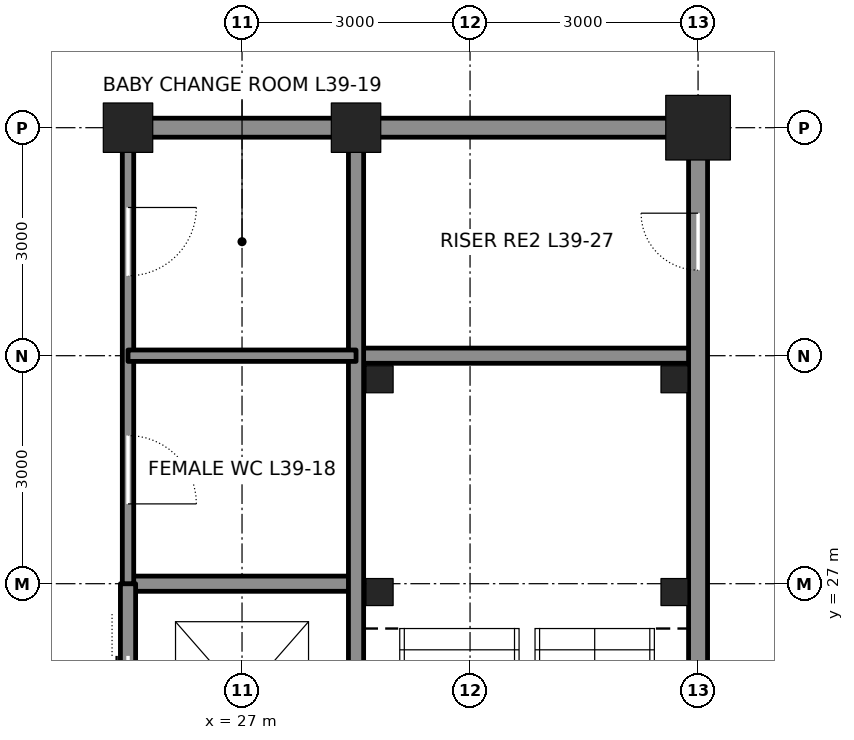
"""IFC4 building model, lengths in metres.
Left out: names, types, materials, properties, quantities, classifications, styles, units other than length and angle.
Written with IfcOpenShell. Run it as: python <this file> out.ifc"""

import sys

from ifc_helpers import new_model, si_unit, direction, frame, frame_2d, origin, origin_2d, place, context, subcontext, project, spatial, rectangle, hollow_rectangle, extrude, element, fill, save


model = new_model("IFC4")
c1 = context("Model", 3, precision=1e-05, world=origin(), true_north=direction((0.0, 1.0)))
c2 = subcontext(c1, "Body", "Model", "MODEL_VIEW")
j1 = project(units=[si_unit("LENGTHUNIT", "METRE"), si_unit("PLANEANGLEUNIT", "RADIAN")], contexts=[c1])
p1 = place(None, origin())
s1 = spatial("IfcSite", under=j1, at=p1, CompositionType="ELEMENT")
p2 = place(p1, origin())
s2 = spatial("IfcBuilding", under=s1, at=p2, CompositionType="ELEMENT")
p3 = place(p2, frame((0.0, 0.0, 180.0)))
s3 = spatial("IfcBuildingStorey", under=s2, at=p3, CompositionType="ELEMENT", Elevation=180.0)
for number, where, z_axis, x_axis in (
    (1, (25.5, 33.0, 0.0), (0.0, 0.0, 1.0), (1.0, 0.0, 0.0)),
    (2, (28.5, 33.0, 0.0), (0.0, 0.0, 1.0), (1.0, 0.0, 0.0)),
):
    element("IfcColumn", number, at=place(p3, frame(where, z_axis=z_axis, x_axis=x_axis)), inside=s3, PredefinedType="COLUMN", context=c2, shape_type="SweptSolid", body=[
        extrude(hollow_rectangle(XDim=0.65, YDim=0.65, WallThickness=0.065, at=origin_2d()), origin(), (0.0, 0.0, 1.0), 4.5),
    ])
p4 = place(p3, frame((33.0, 33.0, 0.0), z_axis=(0.0, 0.0, 1.0), x_axis=(1.0, 0.0, 0.0)))
e3 = element("IfcColumn", 3, at=p4, inside=s3, PredefinedType="COLUMN", context=c2, shape_type="SweptSolid", body=[
    extrude(hollow_rectangle(XDim=0.85, YDim=0.85, WallThickness=0.085, at=origin_2d()), origin(), (0.0, 0.0, 1.0), 4.5),
])
p5 = place(p3, frame((25.5, 27.0, 0.0), z_axis=(0.0, 0.0, 1.0), x_axis=(1.0, 0.0, 0.0)))
e4 = element("IfcWall", 4, at=p5, inside=s3, PredefinedType="SOLIDWALL", context=c2, shape_type="SweptSolid", body=[
    extrude(rectangle(XDim=3.0, YDim=0.2, at=frame_2d((1.5, 0.0))), origin(), (0.0, 0.0, 1.0), 4.34),
])
p6 = place(p3, frame((28.5, 30.0, 0.0), z_axis=(0.0, 0.0, 1.0), x_axis=(1.0, 0.0, 0.0)))
e5 = element("IfcWall", 5, at=p6, inside=s3, PredefinedType="SOLIDWALL", context=c2, shape_type="SweptSolid", body=[
    extrude(rectangle(XDim=4.5, YDim=0.2, at=frame_2d((2.25, 0.0))), origin(), (0.0, 0.0, 1.0), 4.34),
])
p7 = place(p3, frame((25.75, 33.0, 0.0), z_axis=(0.0, 0.0, 1.0), x_axis=(1.0, 0.0, 0.0)))
e6 = element("IfcWall", 6, at=p7, inside=s3, PredefinedType="SOLIDWALL", context=c2, shape_type="SweptSolid", body=[
    extrude(rectangle(XDim=2.5, YDim=0.25, at=frame_2d((1.25, 0.0))), origin(), (0.0, 0.0, 1.0), 3.481),
])
p8 = place(p3, frame((28.75, 33.0, 0.0), z_axis=(0.0, 0.0, 1.0), x_axis=(1.0, 0.0, 0.0)))
e7 = element("IfcWall", 7, at=p8, inside=s3, PredefinedType="SOLIDWALL", context=c2, shape_type="SweptSolid", body=[
    extrude(rectangle(XDim=4.0, YDim=0.25, at=frame_2d((2.0, 0.0))), origin(), (0.0, 0.0, 1.0), 3.481),
])
p9 = place(p3, frame((25.5, 15.0, 0.0), z_axis=(0.0, 0.0, 1.0), x_axis=(0.0, 1.0, 0.0)))
e8 = element("IfcWall", 8, at=p9, inside=s3, PredefinedType="SOLIDWALL", context=c2, shape_type="SweptSolid", body=[
    extrude(rectangle(XDim=12.0, YDim=0.2, at=frame_2d((6.0, 0.0))), origin(), (0.0, 0.0, 1.0), 3.365),
])
p10 = place(p9, frame((0.95, 0.0, 0.0)))
e9 = element("IfcOpeningElement", 9, at=p10, cuts=e8, PredefinedType="OPENING", context=c2, shape_type="SweptSolid", body=[
    extrude(rectangle(XDim=1.1, YDim=2.1, at=frame_2d((0.55, 1.05))), frame((0.0, 0.11, 0.0), z_axis=(0.0, -1.0, 0.0), x_axis=(1.0, 0.0, 0.0)), (0.0, 0.0, 1.0), 0.22),
])
p11 = place(p9, frame((3.95, 0.0, 0.0)))
e10 = element("IfcOpeningElement", 10, at=p11, cuts=e8, PredefinedType="OPENING", context=c2, shape_type="SweptSolid", body=[
    extrude(rectangle(XDim=1.1, YDim=2.1, at=frame_2d((0.55, 1.05))), frame((0.0, 0.11, 0.0), z_axis=(0.0, -1.0, 0.0), x_axis=(1.0, 0.0, 0.0)), (0.0, 0.0, 1.0), 0.22),
])
p12 = place(p9, frame((6.95, 0.0, 0.0)))
e11 = element("IfcOpeningElement", 11, at=p12, cuts=e8, PredefinedType="OPENING", context=c2, shape_type="SweptSolid", body=[
    extrude(rectangle(XDim=1.1, YDim=2.1, at=frame_2d((0.55, 1.05))), frame((0.0, 0.11, 0.0), z_axis=(0.0, -1.0, 0.0), x_axis=(1.0, 0.0, 0.0)), (0.0, 0.0, 1.0), 0.22),
])
p13 = place(p9, frame((9.95, 0.0, 0.0)))
e12 = element("IfcOpeningElement", 12, at=p13, cuts=e8, PredefinedType="OPENING", context=c2, shape_type="SweptSolid", body=[
    extrude(rectangle(XDim=1.1, YDim=2.1, at=frame_2d((0.55, 1.05))), frame((0.0, 0.11, 0.0), z_axis=(0.0, -1.0, 0.0), x_axis=(1.0, 0.0, 0.0)), (0.0, 0.0, 1.0), 0.22),
])
p14 = place(p3, frame((25.5, 27.0, 0.0), z_axis=(0.0, 0.0, 1.0), x_axis=(0.0, 1.0, 0.0)))
e13 = element("IfcWall", 13, at=p14, inside=s3, PredefinedType="PARTITIONING", context=c2, shape_type="SweptSolid", body=[
    extrude(rectangle(XDim=5.75, YDim=0.15, at=frame_2d((2.875, 0.0))), origin(), (0.0, 0.0, 1.0), 3.365),
])
p15 = place(p14, frame((1.05, 0.0, 0.0)))
e14 = element("IfcOpeningElement", 14, at=p15, cuts=e13, PredefinedType="OPENING", context=c2, shape_type="SweptSolid", body=[
    extrude(rectangle(XDim=0.9, YDim=2.1, at=frame_2d((0.45, 1.05))), frame((0.0, 0.085, 0.0), z_axis=(0.0, -1.0, 0.0), x_axis=(1.0, 0.0, 0.0)), (0.0, 0.0, 1.0), 0.17),
])
p16 = place(p14, frame((4.05, 0.0, 0.0)))
e15 = element("IfcOpeningElement", 15, at=p16, cuts=e13, PredefinedType="OPENING", context=c2, shape_type="SweptSolid", body=[
    extrude(rectangle(XDim=0.9, YDim=2.1, at=frame_2d((0.45, 1.05))), frame((0.0, 0.085, 0.0), z_axis=(0.0, -1.0, 0.0), x_axis=(1.0, 0.0, 0.0)), (0.0, 0.0, 1.0), 0.17),
])
p17 = place(p3, frame((28.5, 24.25, 0.0), z_axis=(0.0, 0.0, 1.0), x_axis=(0.0, 1.0, 0.0)))
e16 = element("IfcWall", 16, at=p17, inside=s3, PredefinedType="SOLIDWALL", context=c2, shape_type="SweptSolid", body=[
    extrude(rectangle(XDim=8.5, YDim=0.2, at=frame_2d((4.25, 0.0))), origin(), (0.0, 0.0, 1.0), 3.413),
])
p18 = place(p3, frame((33.0, 24.25, 0.0), z_axis=(0.0, 0.0, 1.0), x_axis=(0.0, 1.0, 0.0)))
e17 = element("IfcWall", 17, at=p18, inside=s3, PredefinedType="SOLIDWALL", context=c2, shape_type="SweptSolid", body=[
    extrude(rectangle(XDim=8.5, YDim=0.25, at=frame_2d((4.25, 0.0))), origin(), (0.0, 0.0, 1.0), 3.413),
])
p19 = place(p18, frame((6.875, 0.0, 0.0)))
e18 = element("IfcOpeningElement", 18, at=p19, cuts=e17, PredefinedType="OPENING", context=c2, shape_type="SweptSolid", body=[
    extrude(rectangle(XDim=0.75, YDim=2.1, at=frame_2d((0.375, 1.05))), frame((0.0, 0.135, 0.0), z_axis=(0.0, -1.0, 0.0), x_axis=(1.0, 0.0, 0.0)), (0.0, 0.0, 1.0), 0.27),
])
p20 = place(p3, frame((25.5, 30.0, 0.0), z_axis=(0.0, 0.0, 1.0), x_axis=(1.0, 0.0, 0.0)))
e19 = element("IfcWall", 19, at=p20, inside=s3, PredefinedType="PARTITIONING", context=c2, shape_type="SweptSolid", body=[
    extrude(rectangle(XDim=3.0, YDim=0.15, at=frame_2d((1.5, 0.0))), origin(), (0.0, 0.0, 1.0), 4.34),
])
for number, where, z_axis, x_axis in (
    (20, (28.81, 29.69, 0.0), (0.0, 0.0, 1.0), (1.0, 0.0, 0.0)),
    (21, (32.69, 29.69, 0.0), (0.0, 0.0, 1.0), (1.0, 0.0, 0.0)),
    (22, (28.81, 26.89, 0.0), (0.0, 0.0, 1.0), (1.0, 0.0, 0.0)),
    (23, (32.69, 26.89, 0.0), (0.0, 0.0, 1.0), (1.0, 0.0, 0.0)),
):
    element("IfcColumn", number, at=place(p3, frame(where, z_axis=z_axis, x_axis=x_axis)), inside=s3, PredefinedType="COLUMN", context=c2, shape_type="SweptSolid", body=[
        extrude(hollow_rectangle(XDim=0.356, YDim=0.356, WallThickness=0.015, at=origin_2d()), origin(), (0.0, 0.0, 1.0), 4.5),
    ])
p21 = place(p19, origin())
e24 = element("IfcDoor", 24, at=p21, inside=s3, OperationType="SINGLE_SWING_RIGHT", PredefinedType="DOOR", context=c2, shape_type="SweptSolid", body=[
    extrude(rectangle(XDim=0.75, YDim=2.1, at=frame_2d((0.375, 1.05))), frame((0.0, 0.025, 0.0), z_axis=(0.0, -1.0, 0.0), x_axis=(1.0, 0.0, 0.0)), (0.0, 0.0, 1.0), 0.05),
])
fill(e18, e24)
p22 = place(p15, frame((0.9, 0.0, 0.0), z_axis=(0.0, 0.0, 1.0), x_axis=(-1.0, 0.0, 0.0)))
e25 = element("IfcDoor", 25, at=p22, inside=s3, OperationType="SINGLE_SWING_RIGHT", PredefinedType="DOOR", context=c2, shape_type="SweptSolid", body=[
    extrude(rectangle(XDim=0.9, YDim=2.1, at=frame_2d((0.45, 1.05))), frame((0.0, 0.025, 0.0), z_axis=(0.0, -1.0, 0.0), x_axis=(1.0, 0.0, 0.0)), (0.0, 0.0, 1.0), 0.05),
])
fill(e14, e25)
p23 = place(p16, frame((0.9, 0.0, 0.0), z_axis=(0.0, 0.0, 1.0), x_axis=(-1.0, 0.0, 0.0)))
e26 = element("IfcDoor", 26, at=p23, inside=s3, OperationType="SINGLE_SWING_LEFT", PredefinedType="DOOR", context=c2, shape_type="SweptSolid", body=[
    extrude(rectangle(XDim=0.9, YDim=2.1, at=frame_2d((0.45, 1.05))), frame((0.0, 0.025, 0.0), z_axis=(0.0, -1.0, 0.0), x_axis=(1.0, 0.0, 0.0)), (0.0, 0.0, 1.0), 0.05),
])
fill(e15, e26)
p24 = place(p13, origin())
e27 = element("IfcDoor", 27, at=p24, inside=s3, OperationType="DOUBLE_DOOR_SLIDING", PredefinedType="DOOR", context=c2, shape_type="SweptSolid", body=[
    extrude(rectangle(XDim=1.1, YDim=2.1, at=frame_2d((0.55, 1.05))), frame((0.0, 0.025, 0.0), z_axis=(0.0, -1.0, 0.0), x_axis=(1.0, 0.0, 0.0)), (0.0, 0.0, 1.0), 0.05),
])
fill(e12, e27)
save(model, sys.argv[1])
